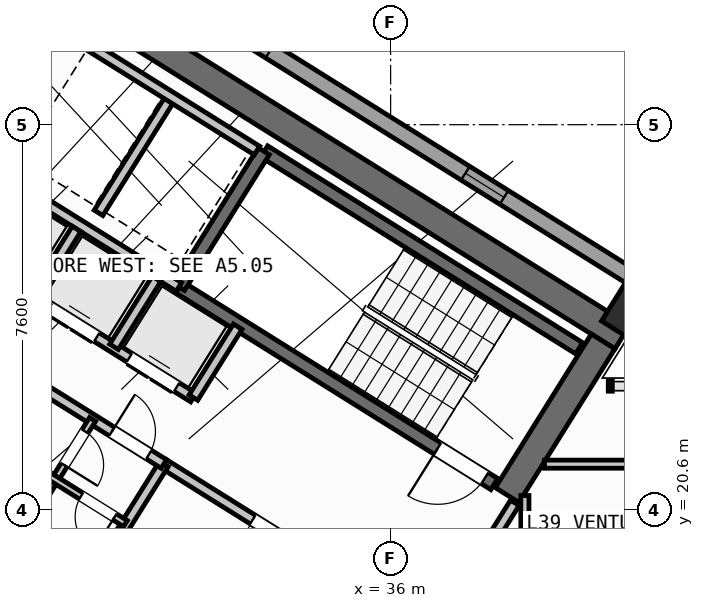
"""IFC4 building model, lengths in metres.
Left out: names, types, materials, properties, quantities, classifications, styles, units other than length and angle.
Written with IfcOpenShell. Run it as: python <this file> out.ifc"""

import sys

from ifc_helpers import new_model, si_unit, direction, frame, frame_2d, origin, origin_2d, place, context, subcontext, project, spatial, rectangle, hollow_rectangle, extrude, source, transform, mapped, element, fill, save


model = new_model("IFC4")
c1 = context("Model", 3, precision=1e-05, world=origin(), true_north=direction((0.0, 1.0)))
c2 = subcontext(c1, "Body", "Model", "MODEL_VIEW")
j1 = project(units=[si_unit("LENGTHUNIT", "METRE"), si_unit("PLANEANGLEUNIT", "RADIAN")], contexts=[c1])
p1 = place(None, origin())
s1 = spatial("IfcSite", under=j1, at=p1, CompositionType="ELEMENT")
p2 = place(p1, origin())
s2 = spatial("IfcBuilding", under=s1, at=p2, CompositionType="ELEMENT")
p3 = place(p2, frame((0.0, 0.0, 155.1)))
s3 = spatial("IfcBuildingStorey", under=s2, at=p3, CompositionType="ELEMENT", Elevation=155.1)
p4 = place(p3, frame((40.573, 24.01, 0.0), z_axis=(0.0, 0.0, 1.0), x_axis=(-0.848047359947, 0.529920442413, 0.0)))
e1 = element("IfcWall", 1, at=p4, inside=s3, PredefinedType="SHEAR", context=c2, shape_type="SweptSolid", body=[
    extrude(rectangle(XDim=13.14, YDim=0.55, at=frame_2d((6.57, 0.0))), origin(), (0.0, 0.0, 1.0), 3.35),
])
p5 = place(p3, frame((40.194, 23.922, 0.0), z_axis=(0.0, 0.0, 1.0), x_axis=(-0.529888438328, -0.848067357541, 0.0)))
e2 = element("IfcWall", 2, at=p5, inside=s3, PredefinedType="SHEAR", context=c2, shape_type="SweptSolid", body=[
    extrude(rectangle(XDim=3.575, YDim=0.55, at=frame_2d((1.788, 0.0))), origin(), (0.0, 0.0, 1.0), 3.35),
])
p6 = place(p3, frame((29.517, 30.594, 0.0), z_axis=(0.0, 0.0, 1.0), x_axis=(-0.529906864564, -0.848055844204, 0.0)))
e3 = element("IfcWall", 3, at=p6, inside=s3, PredefinedType="SHEAR", context=c2, shape_type="SweptSolid", body=[
    extrude(rectangle(XDim=3.575, YDim=0.55, at=frame_2d((1.788, 0.0))), origin(), (0.0, 0.0, 1.0), 3.35),
])
m1 = source(origin(), c2, "Body", "SweptSolid", [
    extrude(hollow_rectangle(XDim=0.9, YDim=0.9, WallThickness=0.036, at=origin_2d()), origin(), (0.0, 0.0, 1.0), 3.6),
])
p7 = place(p3, frame((40.783, 24.469, 0.0), z_axis=(0.0, 0.0, 1.0), x_axis=(-0.848048096156, 0.529919264233, 0.0)))
e4 = element("IfcColumn", 4, at=p7, inside=s3, PredefinedType="COLUMN", context=c2, shape_type="MappedRepresentation", body=[
    mapped(m1, transform((0.0, 0.0, 0.0), scale=1.0)),
])
p8 = place(p3, frame((29.268, 6.429, 0.0), z_axis=(0.0, 0.0, 1.0), x_axis=(-0.848049971435, 0.529916263149, 0.0)))
e5 = element("IfcWall", 5, at=p8, inside=s3, PredefinedType="STANDARD", context=c2, shape_type="SweptSolid", body=[
    extrude(rectangle(XDim=31.588, YDim=0.32, at=frame_2d((15.794, 0.0))), origin(), (0.0, 0.0, 1.0), 3.35),
])
p9 = place(p8, frame((16.362, 0.0, 0.0)))
e6 = element("IfcOpeningElement", 6, at=p9, cuts=e5, PredefinedType="OPENING", context=c2, shape_type="SweptSolid", body=[
    extrude(rectangle(XDim=1.2, YDim=2.15, at=frame_2d((0.6, 1.075))), frame((0.0, 0.17, 0.0), z_axis=(0.0, -1.0, 0.0), x_axis=(1.0, 0.0, 0.0)), (0.0, 0.0, 1.0), 0.34),
])
p10 = place(p8, frame((2.989, 0.0, 0.8)))
e7 = element("IfcOpeningElement", 7, at=p10, cuts=e5, PredefinedType="OPENING", context=c2, shape_type="SweptSolid", body=[
    extrude(rectangle(XDim=2.1, YDim=1.55, at=frame_2d((1.05, 0.775))), frame((0.0, 0.17, 0.0), z_axis=(0.0, -1.0, 0.0), x_axis=(1.0, 0.0, 0.0)), (0.0, 0.0, 1.0), 0.34),
])
p11 = place(p8, frame((8.359, 0.0, 0.8)))
e8 = element("IfcOpeningElement", 8, at=p11, cuts=e5, PredefinedType="OPENING", context=c2, shape_type="SweptSolid", body=[
    extrude(rectangle(XDim=2.1, YDim=1.55, at=frame_2d((1.05, 0.775))), frame((0.0, 0.17, 0.0), z_axis=(0.0, -1.0, 0.0), x_axis=(1.0, 0.0, 0.0)), (0.0, 0.0, 1.0), 0.34),
])
p12 = place(p8, frame((13.284, 0.0, 0.95)))
e9 = element("IfcOpeningElement", 9, at=p12, cuts=e5, PredefinedType="OPENING", context=c2, shape_type="SweptSolid", body=[
    extrude(rectangle(XDim=1.2, YDim=1.4, at=frame_2d((0.6, 0.7))), frame((0.0, 0.17, 0.0), z_axis=(0.0, -1.0, 0.0), x_axis=(1.0, 0.0, 0.0)), (0.0, 0.0, 1.0), 0.34),
])
p13 = place(p8, frame((20.259, 0.0, 0.95)))
e10 = element("IfcOpeningElement", 10, at=p13, cuts=e5, PredefinedType="OPENING", context=c2, shape_type="SweptSolid", body=[
    extrude(rectangle(XDim=1.2, YDim=1.4, at=frame_2d((0.6, 0.7))), frame((0.0, 0.17, 0.0), z_axis=(0.0, -1.0, 0.0), x_axis=(1.0, 0.0, 0.0)), (0.0, 0.0, 1.0), 0.34),
])
p14 = place(p8, frame((22.929, 0.0, 0.95)))
e11 = element("IfcOpeningElement", 11, at=p14, cuts=e5, PredefinedType="OPENING", context=c2, shape_type="SweptSolid", body=[
    extrude(rectangle(XDim=1.2, YDim=1.4, at=frame_2d((0.6, 0.7))), frame((0.0, 0.17, 0.0), z_axis=(0.0, -1.0, 0.0), x_axis=(1.0, 0.0, 0.0)), (0.0, 0.0, 1.0), 0.34),
])
p15 = place(p8, frame((27.481, 0.0, 0.8)))
e12 = element("IfcOpeningElement", 12, at=p15, cuts=e5, PredefinedType="OPENING", context=c2, shape_type="SweptSolid", body=[
    extrude(rectangle(XDim=2.1, YDim=1.55, at=frame_2d((1.05, 0.775))), frame((0.0, 0.17, 0.0), z_axis=(0.0, -1.0, 0.0), x_axis=(1.0, 0.0, 0.0)), (0.0, 0.0, 1.0), 0.34),
])
p16 = place(p3, frame((14.138, 41.825, 0.0), z_axis=(0.0, 0.0, 1.0), x_axis=(0.848046498049, -0.529921821731, 0.0)))
e13 = element("IfcWall", 13, at=p16, inside=s3, PredefinedType="STANDARD", context=c2, shape_type="SweptSolid", body=[
    extrude(rectangle(XDim=31.588, YDim=0.32, at=frame_2d((15.794, 0.0))), origin(), (0.0, 0.0, 1.0), 3.35),
])
p17 = place(p16, frame((9.792, 0.0, 0.0)))
e14 = element("IfcOpeningElement", 14, at=p17, cuts=e13, PredefinedType="OPENING", context=c2, shape_type="SweptSolid", body=[
    extrude(rectangle(XDim=1.05, YDim=2.15, at=frame_2d((0.525, 1.075))), frame((0.0, 0.17, 0.0), z_axis=(0.0, -1.0, 0.0), x_axis=(1.0, 0.0, 0.0)), (0.0, 0.0, 1.0), 0.34),
])
p18 = place(p16, frame((0.791, 0.0, 0.85)))
e15 = element("IfcOpeningElement", 15, at=p18, cuts=e13, PredefinedType="OPENING", context=c2, shape_type="SweptSolid", body=[
    extrude(rectangle(XDim=1.8, YDim=1.5, at=frame_2d((0.9, 0.75))), frame((0.0, 0.17, 0.0), z_axis=(0.0, -1.0, 0.0), x_axis=(1.0, 0.0, 0.0)), (0.0, 0.0, 1.0), 0.34),
])
p19 = place(p16, frame((3.996, 0.0, 0.95)))
e16 = element("IfcOpeningElement", 16, at=p19, cuts=e13, PredefinedType="OPENING", context=c2, shape_type="SweptSolid", body=[
    extrude(rectangle(XDim=1.2, YDim=1.4, at=frame_2d((0.6, 0.7))), frame((0.0, 0.17, 0.0), z_axis=(0.0, -1.0, 0.0), x_axis=(1.0, 0.0, 0.0)), (0.0, 0.0, 1.0), 0.34),
])
p20 = place(p16, frame((13.874, 0.0, 0.85)))
e17 = element("IfcOpeningElement", 17, at=p20, cuts=e13, PredefinedType="OPENING", context=c2, shape_type="SweptSolid", body=[
    extrude(rectangle(XDim=1.5, YDim=1.5, at=frame_2d((0.75, 0.75))), frame((0.0, 0.17, 0.0), z_axis=(0.0, -1.0, 0.0), x_axis=(1.0, 0.0, 0.0)), (0.0, 0.0, 1.0), 0.34),
])
p21 = place(p16, frame((17.104, 0.0, 1.0)))
e18 = element("IfcOpeningElement", 18, at=p21, cuts=e13, PredefinedType="OPENING", context=c2, shape_type="SweptSolid", body=[
    extrude(rectangle(XDim=0.9, YDim=1.25, at=frame_2d((0.45, 0.625))), frame((0.0, 0.17, 0.0), z_axis=(0.0, -1.0, 0.0), x_axis=(1.0, 0.0, 0.0)), (0.0, 0.0, 1.0), 0.34),
])
p22 = place(p16, frame((22.069, 0.0, 1.0)))
e19 = element("IfcOpeningElement", 19, at=p22, cuts=e13, PredefinedType="OPENING", context=c2, shape_type="SweptSolid", body=[
    extrude(rectangle(XDim=0.9, YDim=1.25, at=frame_2d((0.45, 0.625))), frame((0.0, 0.17, 0.0), z_axis=(0.0, -1.0, 0.0), x_axis=(1.0, 0.0, 0.0)), (0.0, 0.0, 1.0), 0.34),
])
p23 = place(p16, frame((27.519, 0.0, 1.0)))
e20 = element("IfcOpeningElement", 20, at=p23, cuts=e13, PredefinedType="OPENING", context=c2, shape_type="SweptSolid", body=[
    extrude(rectangle(XDim=0.9, YDim=1.25, at=frame_2d((0.45, 0.625))), frame((0.0, 0.17, 0.0), z_axis=(0.0, -1.0, 0.0), x_axis=(1.0, 0.0, 0.0)), (0.0, 0.0, 1.0), 0.34),
])
p24 = place(p3, frame((31.28, 18.261, 0.0), z_axis=(0.0, 0.0, 1.0), x_axis=(-0.848051618787, 0.529913626805, 0.0)))
e21 = element("IfcWall", 21, at=p24, inside=s3, PredefinedType="SHEAR", context=c2, shape_type="SweptSolid", body=[
    extrude(rectangle(XDim=7.46, YDim=0.26, at=frame_2d((3.73, 0.0))), origin(), (0.0, 0.0, 1.0), 3.35),
])
p25 = place(p24, frame((0.36, 0.0, 0.0)))
e22 = element("IfcOpeningElement", 22, at=p25, cuts=e21, PredefinedType="OPENING", context=c2, shape_type="SweptSolid", body=[
    extrude(rectangle(XDim=0.86, YDim=2.05, at=frame_2d((0.43, 1.025))), frame((0.0, 0.14, 0.0), z_axis=(0.0, -1.0, 0.0), x_axis=(1.0, 0.0, 0.0)), (0.0, 0.0, 1.0), 0.28),
])
p26 = place(p3, frame((39.721, 23.788, 0.0), z_axis=(0.0, 0.0, 1.0), x_axis=(-0.848054434086, 0.529909121291, 0.0)))
e23 = element("IfcWall", 23, at=p26, inside=s3, PredefinedType="SHEAR", context=c2, shape_type="SweptSolid", body=[
    extrude(rectangle(XDim=7.33, YDim=0.26, at=frame_2d((3.665, 0.0))), origin(), (0.0, 0.0, 1.0), 3.35),
])
p27 = place(p3, frame((38.046, 21.108, 0.0), z_axis=(0.0, 0.0, 1.0), x_axis=(-0.848054434086, 0.529909121291, 0.0)))
e24 = element("IfcWall", 24, at=p27, inside=s3, PredefinedType="SHEAR", context=c2, shape_type="SweptSolid", body=[
    extrude(rectangle(XDim=7.33, YDim=0.26, at=frame_2d((3.665, 0.0))), origin(), (0.0, 0.0, 1.0), 3.35),
])
p28 = place(p27, frame((0.22, 0.0, 0.0)))
e25 = element("IfcOpeningElement", 25, at=p28, cuts=e24, PredefinedType="OPENING", context=c2, shape_type="SweptSolid", body=[
    extrude(rectangle(XDim=1.1, YDim=2.1, at=frame_2d((0.55, 1.05))), frame((0.0, 0.14, 0.0), z_axis=(0.0, -1.0, 0.0), x_axis=(1.0, 0.0, 0.0)), (0.0, 0.0, 1.0), 0.28),
])
p29 = place(p3, frame((33.496, 27.677, 0.0), z_axis=(0.0, 0.0, 1.0), x_axis=(-0.529908658664, -0.84805472316, 0.0)))
e26 = element("IfcWall", 26, at=p29, inside=s3, PredefinedType="SHEAR", context=c2, shape_type="SweptSolid", body=[
    extrude(rectangle(XDim=3.16, YDim=0.26, at=frame_2d((1.58, 0.0))), origin(), (0.0, 0.0, 1.0), 3.35),
])
p30 = place(p3, frame((36.417, 18.447, 0.0), z_axis=(0.0, 0.0, 1.0), x_axis=(-0.848064879198, 0.529892404805, 0.0)))
e27 = element("IfcWall", 27, at=p30, inside=s3, PredefinedType="STANDARD", context=c2, shape_type="SweptSolid", body=[
    extrude(rectangle(XDim=5.768, YDim=0.2, at=frame_2d((2.884, 0.0))), origin(), (0.0, 0.0, 1.0), 3.34),
])
p31 = place(p30, frame((2.548, 0.0, 0.0)))
e28 = element("IfcOpeningElement", 28, at=p31, cuts=e27, PredefinedType="OPENING", context=c2, shape_type="SweptSolid", body=[
    extrude(rectangle(XDim=1.15, YDim=2.1, at=frame_2d((0.575, 1.05))), frame((0.0, 0.11, 0.0), z_axis=(0.0, -1.0, 0.0), x_axis=(1.0, 0.0, 0.0)), (0.0, 0.0, 1.0), 0.22),
])
p32 = place(p3, frame((31.822, 24.998, 0.0), z_axis=(0.0, 0.0, 1.0), x_axis=(-0.848036912365, 0.52993716162, 0.0)))
e29 = element("IfcWall", 29, at=p32, inside=s3, PredefinedType="STANDARD", context=c2, shape_type="SweptSolid", body=[
    extrude(rectangle(XDim=4.618, YDim=0.2, at=frame_2d((2.309, 0.0))), origin(), (0.0, 0.0, 1.0), 3.34),
])
p33 = place(p3, frame((32.108, 22.814, 0.0), z_axis=(0.0, 0.0, 1.0), x_axis=(-0.848042229521, 0.529928652696, 0.0)))
e30 = element("IfcWall", 30, at=p33, inside=s3, PredefinedType="STANDARD", context=c2, shape_type="SweptSolid", body=[
    extrude(rectangle(XDim=5.62, YDim=0.2, at=frame_2d((2.81, 0.0))), origin(), (0.0, 0.0, 1.0), 3.34),
])
p34 = place(p33, frame((0.39, 0.0, 0.0)))
e31 = element("IfcOpeningElement", 31, at=p34, cuts=e30, PredefinedType="OPENING", context=c2, shape_type="SweptSolid", body=[
    extrude(rectangle(XDim=1.1, YDim=2.15, at=frame_2d((0.55, 1.075))), frame((0.0, 0.11, 0.0), z_axis=(0.0, -1.0, 0.0), x_axis=(1.0, 0.0, 0.0)), (0.0, 0.0, 1.0), 0.22),
])
p35 = place(p33, frame((2.25, 0.0, 0.0)))
e32 = element("IfcOpeningElement", 32, at=p35, cuts=e30, PredefinedType="OPENING", context=c2, shape_type="SweptSolid", body=[
    extrude(rectangle(XDim=1.1, YDim=2.15, at=frame_2d((0.55, 1.075))), frame((0.0, 0.11, 0.0), z_axis=(0.0, -1.0, 0.0), x_axis=(1.0, 0.0, 0.0)), (0.0, 0.0, 1.0), 0.22),
])
p36 = place(p33, frame((4.11, 0.0, 0.0)))
e33 = element("IfcOpeningElement", 33, at=p36, cuts=e30, PredefinedType="OPENING", context=c2, shape_type="SweptSolid", body=[
    extrude(rectangle(XDim=1.1, YDim=2.15, at=frame_2d((0.55, 1.075))), frame((0.0, 0.11, 0.0), z_axis=(0.0, -1.0, 0.0), x_axis=(1.0, 0.0, 0.0)), (0.0, 0.0, 1.0), 0.22),
])
p37 = place(p3, frame((32.982, 24.213, 0.0), z_axis=(0.0, 0.0, 1.0), x_axis=(-0.529839334948, -0.84809803628, 0.0)))
e34 = element("IfcWall", 34, at=p37, inside=s3, PredefinedType="STANDARD", context=c2, shape_type="SweptSolid", body=[
    extrude(rectangle(XDim=1.65, YDim=0.2, at=frame_2d((0.825, 0.0))), origin(), (0.0, 0.0, 1.0), 3.34),
])
p38 = place(p3, frame((31.645, 28.716, 0.0), z_axis=(0.0, 0.0, 1.0), x_axis=(-0.52986693015, -0.848080795876, 0.0)))
e35 = element("IfcWall", 35, at=p38, inside=s3, PredefinedType="STANDARD", context=c2, shape_type="SweptSolid", body=[
    extrude(rectangle(XDim=2.66, YDim=0.2, at=frame_2d((1.33, 0.0))), origin(), (0.0, 0.0, 1.0), 3.34),
])
p39 = place(p3, frame((33.363, 27.69, 0.0), z_axis=(0.0, 0.0, 1.0), x_axis=(-0.848047090064, 0.529920874315, 0.0)))
e36 = element("IfcWall", 36, at=p39, inside=s3, PredefinedType="STANDARD", context=c2, shape_type="SweptSolid", body=[
    extrude(rectangle(XDim=4.498, YDim=0.2, at=frame_2d((2.249, 0.0))), origin(), (0.0, 0.0, 1.0), 3.34),
])
for number, where, z_axis, x_axis in (
    (37, (31.379, 25.156, 0.0), (0.0, 0.0, 1.0), (-0.53, -0.848, 0.0)),
    (38, (29.801, 26.142, 0.0), (0.0, 0.0, 1.0), (-0.53, -0.848, 0.0)),
):
    element("IfcWall", number, at=place(p3, frame(where, z_axis=z_axis, x_axis=x_axis)), inside=s3, PredefinedType="STANDARD", context=c2, shape_type="SweptSolid", body=[
        extrude(rectangle(XDim=1.58, YDim=0.2, at=frame_2d((0.79, 0.0))), origin(), (0.0, 0.0, 1.0), 3.34),
    ])
p40 = place(p3, frame((31.525, 21.504, 0.0), z_axis=(0.0, 0.0, 1.0), x_axis=(-0.529907497854, -0.848055448493, 0.0)))
e39 = element("IfcWall", 39, at=p40, inside=s3, PredefinedType="STANDARD", context=c2, shape_type="SweptSolid", body=[
    extrude(rectangle(XDim=2.88, YDim=0.2, at=frame_2d((1.44, 0.0))), origin(), (0.0, 0.0, 1.0), 3.34),
])
p41 = place(p3, frame((31.525, 21.504, 0.0), z_axis=(0.0, 0.0, 1.0), x_axis=(-0.848040211232, 0.529931882541, 0.0)))
e40 = element("IfcWall", 40, at=p41, inside=s3, PredefinedType="STANDARD", context=c2, shape_type="SweptSolid", body=[
    extrude(rectangle(XDim=6.218, YDim=0.2, at=frame_2d((3.109, 0.0))), origin(), (0.0, 0.0, 1.0), 3.34),
])
p42 = place(p41, frame((4.4, 0.0, 0.0)))
e41 = element("IfcOpeningElement", 41, at=p42, cuts=e40, PredefinedType="OPENING", context=c2, shape_type="SweptSolid", body=[
    extrude(rectangle(XDim=0.86, YDim=2.05, at=frame_2d((0.43, 1.025))), frame((0.0, 0.11, 0.0), z_axis=(0.0, -1.0, 0.0), x_axis=(1.0, 0.0, 0.0)), (0.0, 0.0, 1.0), 0.22),
])
p43 = place(p41, frame((0.35, 0.0, 0.0)))
e42 = element("IfcOpeningElement", 42, at=p43, cuts=e40, PredefinedType="OPENING", context=c2, shape_type="SweptSolid", body=[
    extrude(rectangle(XDim=0.86, YDim=2.05, at=frame_2d((0.43, 1.025))), frame((0.0, 0.11, 0.0), z_axis=(0.0, -1.0, 0.0), x_axis=(1.0, 0.0, 0.0)), (0.0, 0.0, 1.0), 0.22),
])
p44 = place(p3, frame((30.117, 22.384, 0.0), z_axis=(0.0, 0.0, 1.0), x_axis=(-0.529951914384, -0.848027693204, 0.0)))
e43 = element("IfcWall", 43, at=p44, inside=s3, PredefinedType="PLUMBINGWALL", context=c2, shape_type="SweptSolid", body=[
    extrude(rectangle(XDim=1.4, YDim=0.14, at=frame_2d((0.7, 0.0))), origin(), (0.0, 0.0, 1.0), 3.34),
])
p45 = place(p44, frame((0.28, 0.0, 0.0)))
e44 = element("IfcOpeningElement", 44, at=p45, cuts=e43, PredefinedType="OPENING", context=c2, shape_type="SweptSolid", body=[
    extrude(rectangle(XDim=0.78, YDim=2.05, at=frame_2d((0.39, 1.025))), frame((0.0, 0.08, 0.0), z_axis=(0.0, -1.0, 0.0), x_axis=(1.0, 0.0, 0.0)), (0.0, 0.0, 1.0), 0.16),
])
p46 = place(p3, frame((29.375, 21.196, 0.0), z_axis=(0.0, 0.0, 1.0), x_axis=(-0.529865479138, -0.848081702443, 0.0)))
e45 = element("IfcWall", 45, at=p46, inside=s3, PredefinedType="PLUMBINGWALL", context=c2, shape_type="SweptSolid", body=[
    extrude(rectangle(XDim=1.48, YDim=0.14, at=frame_2d((0.74, 0.0))), origin(), (0.0, 0.0, 1.0), 3.34),
])
p47 = place(p3, frame((30.766, 20.327, 0.0), z_axis=(0.0, 0.0, 1.0), x_axis=(-0.848052663127, 0.529911955482, 0.0)))
e46 = element("IfcWall", 46, at=p47, inside=s3, PredefinedType="PLUMBINGWALL", context=c2, shape_type="SweptSolid", body=[
    extrude(rectangle(XDim=3.28, YDim=0.14, at=frame_2d((1.64, 0.0))), origin(), (0.0, 0.0, 1.0), 3.34),
])
p48 = place(p47, frame((0.25, 0.0, 0.0)))
e47 = element("IfcOpeningElement", 47, at=p48, cuts=e46, PredefinedType="OPENING", context=c2, shape_type="SweptSolid", body=[
    extrude(rectangle(XDim=0.78, YDim=2.05, at=frame_2d((0.39, 1.025))), frame((0.0, 0.08, 0.0), z_axis=(0.0, -1.0, 0.0), x_axis=(1.0, 0.0, 0.0)), (0.0, 0.0, 1.0), 0.16),
])
p49 = place(p47, frame((1.92, 0.0, 0.0)))
e48 = element("IfcOpeningElement", 48, at=p49, cuts=e46, PredefinedType="OPENING", context=c2, shape_type="SweptSolid", body=[
    extrude(rectangle(XDim=0.78, YDim=2.05, at=frame_2d((0.39, 1.025))), frame((0.0, 0.08, 0.0), z_axis=(0.0, -1.0, 0.0), x_axis=(1.0, 0.0, 0.0)), (0.0, 0.0, 1.0), 0.16),
])
p50 = place(p3, frame((38.451, 20.737, 0.0), z_axis=(0.0, 0.0, 1.0), x_axis=(-0.529924799939, -0.848044637038, 0.0)))
e49 = element("IfcWall", 49, at=p50, inside=s3, PredefinedType="STANDARD", context=c2, shape_type="SweptSolid", body=[
    extrude(rectangle(XDim=2.96, YDim=0.2, at=frame_2d((1.48, 0.0))), origin(), (0.0, 0.0, 1.0), 3.34),
])
p51 = place(p50, frame((1.46, 0.0, 0.0)))
e50 = element("IfcOpeningElement", 50, at=p51, cuts=e49, PredefinedType="OPENING", context=c2, shape_type="SweptSolid", body=[
    extrude(rectangle(XDim=0.86, YDim=2.05, at=frame_2d((0.43, 1.025))), frame((0.0, 0.11, 0.0), z_axis=(0.0, -1.0, 0.0), x_axis=(1.0, 0.0, 0.0)), (0.0, 0.0, 1.0), 0.22),
])
p52 = place(p3, frame((38.65, 17.93, 0.0), z_axis=(0.0, 0.0, 1.0), x_axis=(0.0, 1.0, 0.0)))
e51 = element("IfcWall", 51, at=p52, inside=s3, PredefinedType="PARTITIONING", context=c2, shape_type="SweptSolid", body=[
    extrude(rectangle(XDim=2.951, YDim=0.16, at=frame_2d((1.476, 0.0))), origin(), (0.0, 0.0, 1.0), 3.34),
])
p53 = place(p3, frame((39.037, 21.5, 0.0), z_axis=(0.0, 0.0, 1.0), x_axis=(1.0, 0.0, 0.0)))
e52 = element("IfcWall", 52, at=p53, inside=s3, PredefinedType="PARTITIONING", context=c2, shape_type="SweptSolid", body=[
    extrude(rectangle(XDim=7.215, YDim=0.16, at=frame_2d((3.607, 0.0))), origin(), (0.0, 0.0, 1.0), 3.34),
])
m2 = source(origin(), c2, "Body", "SweptSolid", [
    extrude(rectangle(XDim=0.9, YDim=1.25, at=frame_2d((0.45, 0.625))), frame((0.0, 0.03, 0.0), z_axis=(0.0, -1.0, 0.0), x_axis=(1.0, 0.0, 0.0)), (0.0, 0.0, 1.0), 0.06),
])
p54 = place(p22, origin())
e53 = element("IfcWindow", 53, at=p54, inside=s3, PartitioningType="SINGLE_PANEL", PredefinedType="WINDOW", context=c2, shape_type="MappedRepresentation", body=[
    mapped(m2, transform((0.0, 0.0, 0.0), scale=1.0)),
])
fill(e19, e53)
p55 = place(p23, origin())
e54 = element("IfcWindow", 54, at=p55, inside=s3, PartitioningType="SINGLE_PANEL", PredefinedType="WINDOW", context=c2, shape_type="MappedRepresentation", body=[
    mapped(m2, transform((0.0, 0.0, 0.0), scale=1.0)),
])
fill(e20, e54)
m3 = source(origin(), c2, "Body", "SweptSolid", [
    extrude(rectangle(XDim=1.1, YDim=2.1, at=frame_2d((0.55, 1.05))), frame((0.0, 0.025, 0.0), z_axis=(0.0, -1.0, 0.0), x_axis=(1.0, 0.0, 0.0)), (0.0, 0.0, 1.0), 0.05),
])
p56 = place(p28, origin())
e55 = element("IfcDoor", 55, at=p56, inside=s3, OperationType="SINGLE_SWING_RIGHT", PredefinedType="DOOR", context=c2, shape_type="MappedRepresentation", body=[
    mapped(m3, transform((0.0, 0.0, 0.0), scale=1.0)),
])
fill(e25, e55)
m4 = source(origin(), c2, "Body", "SweptSolid", [
    extrude(rectangle(XDim=1.15, YDim=2.1, at=frame_2d((0.575, 1.05))), frame((0.0, 0.025, 0.0), z_axis=(0.0, -1.0, 0.0), x_axis=(1.0, 0.0, 0.0)), (0.0, 0.0, 1.0), 0.05),
])
p57 = place(p31, origin())
e56 = element("IfcDoor", 56, at=p57, inside=s3, OperationType="SINGLE_SWING_LEFT", PredefinedType="DOOR", context=c2, shape_type="MappedRepresentation", body=[
    mapped(m4, transform((0.0, 0.0, 0.0), scale=1.0)),
])
fill(e28, e56)
m5 = source(origin(), c2, "Body", "SweptSolid", [
    extrude(rectangle(XDim=1.1, YDim=2.15, at=frame_2d((0.55, 1.075))), frame((0.0, 0.025, 0.0), z_axis=(0.0, -1.0, 0.0), x_axis=(1.0, 0.0, 0.0)), (0.0, 0.0, 1.0), 0.05),
])
p58 = place(p34, origin())
e57 = element("IfcDoor", 57, at=p58, inside=s3, OperationType="DOUBLE_DOOR_SLIDING", PredefinedType="DOOR", context=c2, shape_type="MappedRepresentation", body=[
    mapped(m5, transform((0.0, 0.0, 0.0), scale=1.0)),
])
fill(e31, e57)
p59 = place(p35, origin())
e58 = element("IfcDoor", 58, at=p59, inside=s3, OperationType="DOUBLE_DOOR_SLIDING", PredefinedType="DOOR", context=c2, shape_type="MappedRepresentation", body=[
    mapped(m5, transform((0.0, 0.0, 0.0), scale=1.0)),
])
fill(e32, e58)
m6 = source(origin(), c2, "Body", "SweptSolid", [
    extrude(rectangle(XDim=0.86, YDim=2.05, at=frame_2d((0.43, 1.025))), frame((0.0, 0.025, 0.0), z_axis=(0.0, -1.0, 0.0), x_axis=(1.0, 0.0, 0.0)), (0.0, 0.0, 1.0), 0.05),
])
p60 = place(p43, frame((0.86, 0.0, 0.0), z_axis=(0.0, 0.0, 1.0), x_axis=(-1.0, 0.0, 0.0)))
e59 = element("IfcDoor", 59, at=p60, inside=s3, OperationType="SINGLE_SWING_LEFT", PredefinedType="DOOR", context=c2, shape_type="MappedRepresentation", body=[
    mapped(m6, transform((0.0, 0.0, 0.0), scale=1.0)),
])
fill(e42, e59)
m7 = source(origin(), c2, "Body", "SweptSolid", [
    extrude(rectangle(XDim=0.78, YDim=2.05, at=frame_2d((0.39, 1.025))), frame((0.0, 0.025, 0.0), z_axis=(0.0, -1.0, 0.0), x_axis=(1.0, 0.0, 0.0)), (0.0, 0.0, 1.0), 0.05),
])
p61 = place(p45, origin())
e60 = element("IfcDoor", 60, at=p61, inside=s3, OperationType="SINGLE_SWING_RIGHT", PredefinedType="DOOR", context=c2, shape_type="MappedRepresentation", body=[
    mapped(m7, transform((0.0, 0.0, 0.0), scale=1.0)),
])
fill(e44, e60)
p62 = place(p48, origin())
e61 = element("IfcDoor", 61, at=p62, inside=s3, OperationType="SINGLE_SWING_LEFT", PredefinedType="DOOR", context=c2, shape_type="MappedRepresentation", body=[
    mapped(m7, transform((0.0, 0.0, 0.0), scale=1.0)),
])
fill(e47, e61)
save(model, sys.argv[1])
